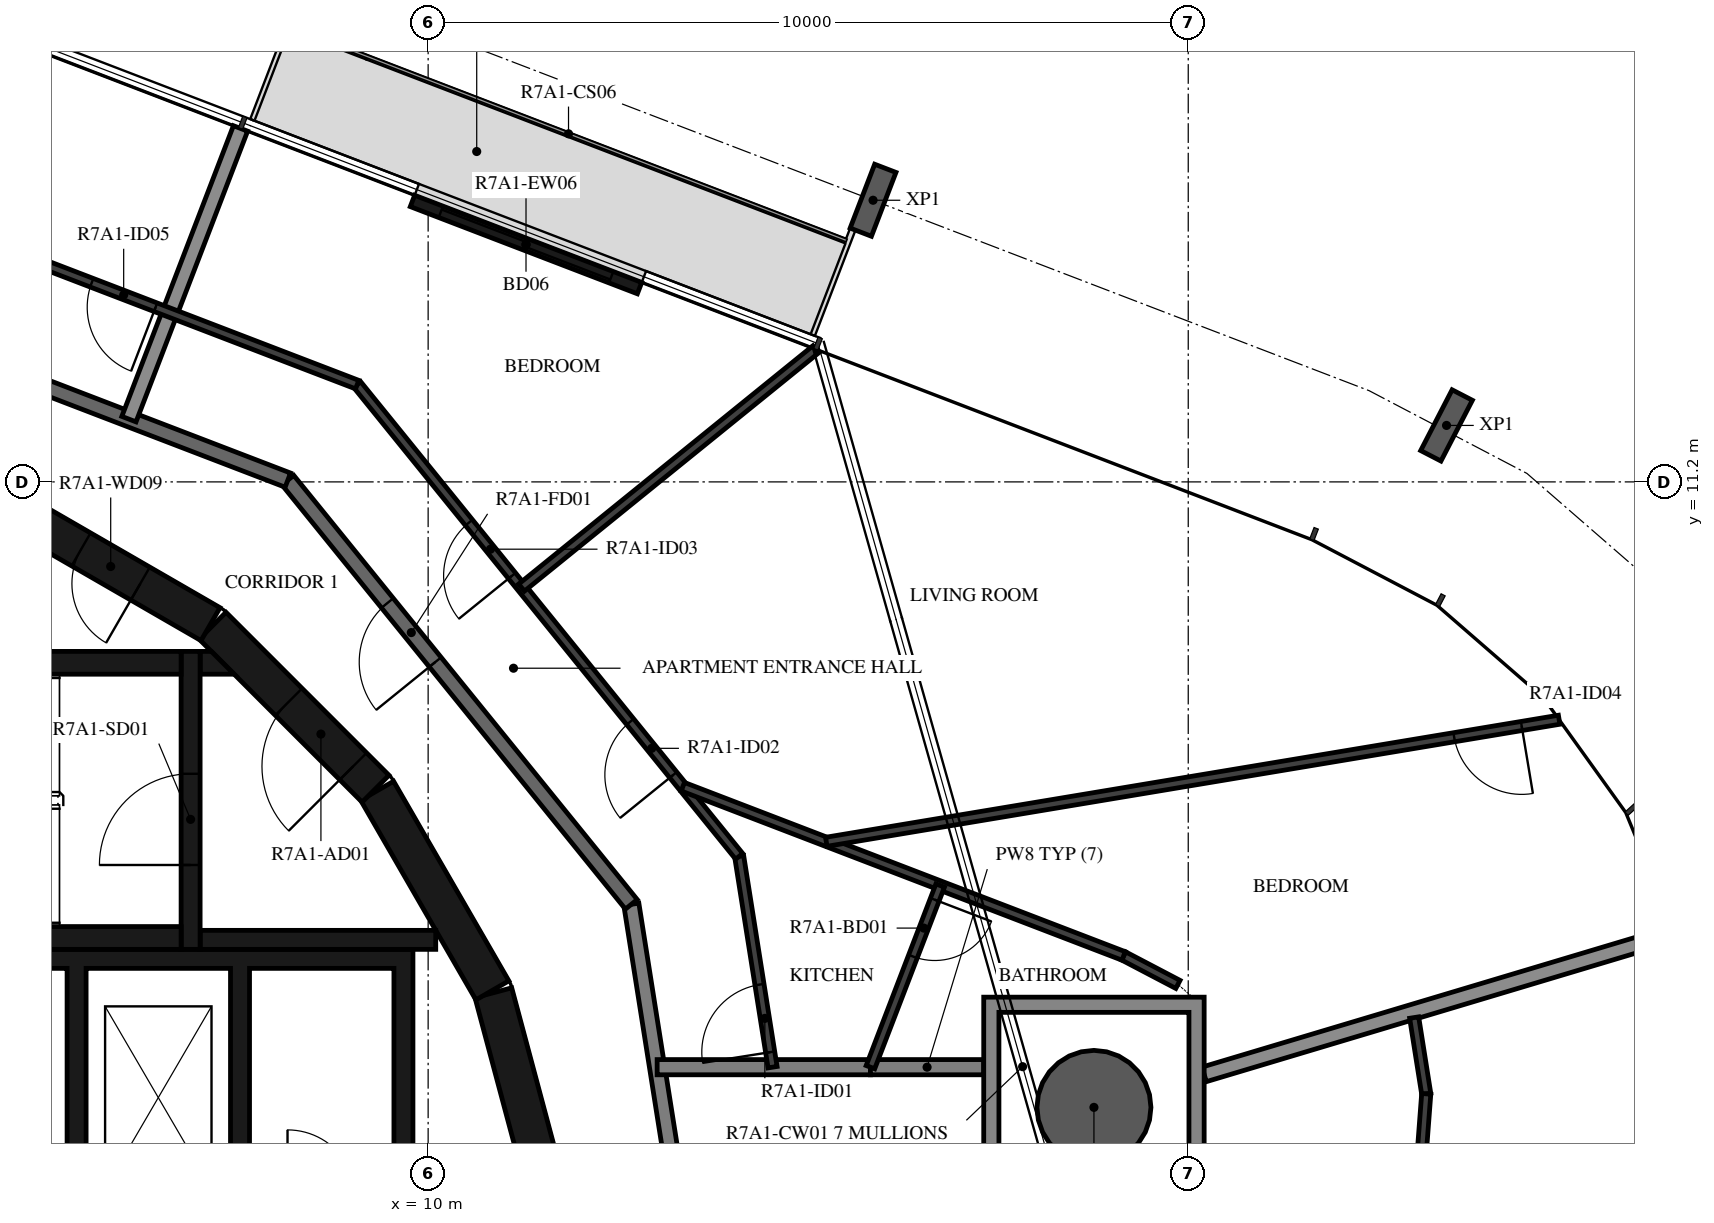
"""IFC4 building model, lengths in metres.
Left out: names, types, materials, properties, quantities, classifications, styles, units other than length and angle.
Written with IfcOpenShell. Run it as: python <this file> out.ifc"""

import sys

from ifc_helpers import new_model, si_unit, direction, frame, frame_2d, origin, origin_2d, place, context, subcontext, project, spatial, polyline, rectangle, hollow_circle, i_section, outline, extrude, element, fill, save


model = new_model("IFC4")
c1 = context("Model", 3, precision=1e-05, world=origin(), true_north=direction((0.0, 1.0)))
c2 = subcontext(c1, "Body", "Model", "MODEL_VIEW")
j1 = project(units=[si_unit("LENGTHUNIT", "METRE"), si_unit("PLANEANGLEUNIT", "RADIAN")], contexts=[c1])
p1 = place(None, origin())
s1 = spatial("IfcSite", under=j1, at=p1, CompositionType="ELEMENT")
p2 = place(p1, origin())
s2 = spatial("IfcBuilding", under=s1, at=p2, CompositionType="ELEMENT")
p3 = place(p2, frame((0.0, 0.0, 266.9)))
s3 = spatial("IfcBuildingStorey", under=s2, at=p3, CompositionType="ELEMENT", Elevation=266.9)
p4 = place(p3, frame((18.76, 2.971, -0.38), z_axis=(0.0, 0.0, 1.0), x_axis=(1.0, 0.0, 0.0)))
e1 = element("IfcColumn", 1, at=p4, inside=s3, PredefinedType="COLUMN", context=c2, shape_type="SweptSolid", body=[
    extrude(hollow_circle(Radius=0.75, WallThickness=0.035, at=origin_2d()), origin(), (0.0, 0.0, 1.0), 3.5),
])
for number, where, z_axis, x_axis in (
    (2, (23.398, 11.943, -0.38), (0.0, 0.0, 1.0), (0.888, -0.459, 0.0)),
    (3, (15.854, 14.905, -0.38), (0.0, 0.0, 1.0), (0.934, -0.358, 0.0)),
):
    element("IfcColumn", number, at=place(p3, frame(where, z_axis=z_axis, x_axis=x_axis)), inside=s3, PredefinedType="COLUMN", context=c2, shape_type="SweptSolid", body=[
        extrude(i_section(OverallWidth=0.3, OverallDepth=0.9, WebThickness=0.019, FlangeThickness=0.035, FilletRadius=0.03, at=origin_2d()), origin(), (0.0, 0.0, 1.0), 3.5),
    ])
p5 = place(p3, frame((12.781, 13.75, 0.0), z_axis=(0.0, 0.0, 1.0), x_axis=(-0.933579413923, 0.358370587381, 0.0)))
e4 = element("IfcWall", 4, at=p5, inside=s3, PredefinedType="STANDARD", context=c2, shape_type="SweptSolid", body=[
    extrude(rectangle(XDim=3.2, YDim=0.16, at=frame_2d((1.6, 0.0))), origin(), (0.0, 0.0, 1.0), 3.12),
])
p6 = place(p5, frame((0.4, 0.0, 0.0)))
e5 = element("IfcOpeningElement", 5, at=p6, cuts=e4, PredefinedType="OPENING", context=c2, shape_type="SweptSolid", body=[
    extrude(rectangle(XDim=2.4, YDim=2.4, at=frame_2d((1.2, 1.2))), frame((0.0, 0.09, 0.0), z_axis=(0.0, -1.0, 0.0), x_axis=(1.0, 0.0, 0.0)), (0.0, 0.0, 1.0), 0.18),
])
for number, where, z_axis, x_axis in (
    (6, (11.643, 1.55, 0.0), (0.0, 0.0, 1.0), (-0.259, 0.966, 0.0)),
    (7, (10.845, 4.51, 0.0), (0.0, 0.0, 1.0), (-0.5, 0.866, 0.0)),
):
    element("IfcWall", number, at=place(p3, frame(where, z_axis=z_axis, x_axis=x_axis)), inside=s3, PredefinedType="SHEAR", context=c2, shape_type="SweptSolid", body=[
        extrude(rectangle(XDim=3.033, YDim=0.5, at=frame_2d((1.516, 0.0))), origin(), (0.0, 0.0, 1.0), 3.12),
    ])
p7 = place(p3, frame((9.308, 7.164, 0.0), z_axis=(0.0, 0.0, 1.0), x_axis=(-0.707106781187, 0.707106781187, 0.0)))
e8 = element("IfcWall", 8, at=p7, inside=s3, PredefinedType="SHEAR", context=c2, shape_type="SweptSolid", body=[
    extrude(rectangle(XDim=3.032, YDim=0.5, at=frame_2d((1.516, 0.0))), origin(), (0.0, 0.0, 1.0), 3.12),
])
p8 = place(p7, frame((0.416, 0.0, 0.0)))
e9 = element("IfcOpeningElement", 9, at=p8, cuts=e8, PredefinedType="OPENING", context=c2, shape_type="SweptSolid", body=[
    extrude(rectangle(XDim=1.2, YDim=2.1, at=frame_2d((0.6, 1.05))), frame((0.0, 0.26, 0.0), z_axis=(0.0, -1.0, 0.0), x_axis=(1.0, 0.0, 0.0)), (0.0, 0.0, 1.0), 0.52),
])
p9 = place(p3, frame((7.137, 9.329, 0.0), z_axis=(0.0, 0.0, 1.0), x_axis=(-0.865975092491, 0.500087131594, 0.0)))
e10 = element("IfcWall", 10, at=p9, inside=s3, PredefinedType="SHEAR", context=c2, shape_type="SweptSolid", body=[
    extrude(rectangle(XDim=3.033, YDim=0.5, at=frame_2d((1.516, 0.0))), origin(), (0.0, 0.0, 1.0), 3.12),
])
p10 = place(p9, frame((1.066, 0.0, 0.0)))
e11 = element("IfcOpeningElement", 11, at=p10, cuts=e10, PredefinedType="OPENING", context=c2, shape_type="SweptSolid", body=[
    extrude(rectangle(XDim=0.9, YDim=2.1, at=frame_2d((0.45, 1.05))), frame((0.0, 0.26, 0.0), z_axis=(0.0, -1.0, 0.0), x_axis=(1.0, 0.0, 0.0)), (0.0, 0.0, 1.0), 0.52),
])
for number, where, z_axis, x_axis in (
    (12, (0.0, 5.2, 0.0), (0.0, 0.0, 1.0), (1.0, 0.0, 0.0)),
    (13, (0.0, 8.82, 0.0), (0.0, 0.0, 1.0), (1.0, 0.0, 0.0)),
):
    element("IfcWall", number, at=place(p3, frame(where, z_axis=z_axis, x_axis=x_axis)), inside=s3, PredefinedType="SHEAR", context=c2, shape_type="SweptSolid", body=[
        extrude(rectangle(XDim=6.75, YDim=0.3, at=frame_2d((3.375, 0.0))), origin(), (0.0, 0.0, 1.0), 3.12),
    ])
p11 = place(p3, frame((6.875, 5.05, 0.0), z_axis=(0.0, 0.0, 1.0), x_axis=(0.0, 1.0, 0.0)))
e14 = element("IfcWall", 14, at=p11, inside=s3, PredefinedType="SHEAR", context=c2, shape_type="SweptSolid", body=[
    extrude(rectangle(XDim=3.92, YDim=0.25, at=frame_2d((1.96, 0.0))), origin(), (0.0, 0.0, 1.0), 3.12),
])
p12 = place(p11, frame((1.11, 0.0, 0.0)))
e15 = element("IfcOpeningElement", 15, at=p12, cuts=e14, PredefinedType="OPENING", context=c2, shape_type="SweptSolid", body=[
    extrude(rectangle(XDim=1.2, YDim=2.1, at=frame_2d((0.6, 1.05))), frame((0.0, 0.135, 0.0), z_axis=(0.0, -1.0, 0.0), x_axis=(1.0, 0.0, 0.0)), (0.0, 0.0, 1.0), 0.27),
])
p13 = place(p3, frame((7.0, 5.175, 0.0), z_axis=(0.0, 0.0, 1.0), x_axis=(1.0, 0.0, 0.0)))
e16 = element("IfcWall", 16, at=p13, inside=s3, PredefinedType="SHEAR", context=c2, shape_type="SweptSolid", body=[
    extrude(rectangle(XDim=3.1, YDim=0.25, at=frame_2d((1.55, 0.0))), origin(), (0.0, 0.0, 1.0), 3.12),
])
p14 = place(p3, origin())
e17 = element("IfcWall", 17, at=p14, inside=s3, PredefinedType="SHEAR", context=c2, shape_type="SweptSolid", body=[
    extrude(outline(polyline([(7.448, 8.67), (7.0, 8.67), (7.0, 8.97), (7.148, 8.97), (7.448, 8.67)])), origin(), (0.0, 0.0, 1.0), 3.12),
])
p15 = place(p3, origin())
e18 = element("IfcWall", 18, at=p15, inside=s3, PredefinedType="SHEAR", context=c2, shape_type="SweptSolid", body=[
    extrude(outline(polyline([(-9.8, 1.9), (-9.55, 1.9), (-9.55, 4.8), (3.1, 4.8), (3.1, 1.9), (3.35, 1.9), (3.35, 4.8), (5.25, 4.8), (5.25, 1.9), (5.5, 1.9), (5.5, 4.8), (7.4, 4.8), (7.4, 1.9), (7.65, 1.9), (7.65, 4.8), (9.55, 4.8), (9.55, 1.9), (9.8, 1.9), (9.8, 4.8), (9.8, 5.05), (-9.8, 5.05), (-9.8, 4.8), (-9.8, 1.9)])), origin(), (0.0, 0.0, 1.0), 3.12),
])
p16 = place(p3, frame((13.797, -1.45, 0.0), z_axis=(0.0, 0.0, 1.0), x_axis=(-0.156421704315, 0.987690361611, 0.0)))
e19 = element("IfcWall", 19, at=p16, inside=s3, PredefinedType="STANDARD", context=c2, shape_type="SweptSolid", body=[
    extrude(rectangle(XDim=7.181, YDim=0.2, at=frame_2d((3.591, 0.0))), origin(), (0.0, 0.0, 1.0), 3.12),
])
p17 = place(p3, frame((12.673, 5.643, 0.0), z_axis=(0.0, 0.0, 1.0), x_axis=(-0.629302871585, 0.777160148113, 0.0)))
e20 = element("IfcWall", 20, at=p17, inside=s3, PredefinedType="STANDARD", context=c2, shape_type="SweptSolid", body=[
    extrude(rectangle(XDim=7.181, YDim=0.2, at=frame_2d((3.59, 0.0))), origin(), (0.0, 0.0, 1.0), 3.12),
])
p18 = place(p17, frame((4.1, 0.0, 0.0)))
e21 = element("IfcOpeningElement", 21, at=p18, cuts=e20, PredefinedType="OPENING", context=c2, shape_type="SweptSolid", body=[
    extrude(rectangle(XDim=1.0, YDim=2.1, at=frame_2d((0.5, 1.05))), frame((0.0, 0.11, 0.0), z_axis=(0.0, -1.0, 0.0), x_axis=(1.0, 0.0, 0.0)), (0.0, 0.0, 1.0), 0.22),
])
p19 = place(p3, frame((8.154, 11.223, 0.0), z_axis=(0.0, 0.0, 1.0), x_axis=(-0.93359073609, 0.358341090983, 0.0)))
e22 = element("IfcWall", 22, at=p19, inside=s3, PredefinedType="STANDARD", context=c2, shape_type="SweptSolid", body=[
    extrude(rectangle(XDim=7.181, YDim=0.2, at=frame_2d((3.59, 0.0))), origin(), (0.0, 0.0, 1.0), 3.12),
])
p20 = place(p3, frame((15.819, 3.5, 0.0), z_axis=(0.0, 0.0, 1.0), x_axis=(-1.0, 0.0, 0.0)))
e23 = element("IfcWall", 23, at=p20, inside=s3, PredefinedType="STANDARD", context=c2, shape_type="SweptSolid", body=[
    extrude(rectangle(XDim=2.806, YDim=0.2, at=frame_2d((1.403, 0.0))), origin(), (0.0, 0.0, 1.0), 3.12),
])
p21 = place(p3, frame((17.309, 3.5, 0.0), z_axis=(0.0, 0.0, 1.0), x_axis=(-1.0, 0.0, 0.0)))
e24 = element("IfcWall", 24, at=p21, inside=s3, PredefinedType="STANDARD", context=c2, shape_type="SweptSolid", body=[
    extrude(rectangle(XDim=1.49, YDim=0.2, at=frame_2d((0.745, 0.0))), origin(), (0.0, 0.0, 1.0), 3.12),
])
p22 = place(p3, frame((7.532, 15.85, 0.0), z_axis=(0.0, 0.0, 1.0), x_axis=(-0.358355996975, -0.933585014571, 0.0)))
e25 = element("IfcWall", 25, at=p22, inside=s3, PredefinedType="STANDARD", context=c2, shape_type="SweptSolid", body=[
    extrude(rectangle(XDim=4.096, YDim=0.2, at=frame_2d((2.048, 0.0))), origin(), (0.0, 0.0, 1.0), 2.73),
])
p23 = place(p3, frame((20.209, 3.405, 0.0), z_axis=(0.0, 0.0, 1.0), x_axis=(0.957991224208, 0.286797514529, 0.0)))
e26 = element("IfcWall", 26, at=p23, inside=s3, PredefinedType="STANDARD", context=c2, shape_type="SweptSolid", body=[
    extrude(rectangle(XDim=6.471, YDim=0.2, at=frame_2d((3.236, 0.0))), origin(), (0.0, 0.0, 1.0), 2.73),
])
p24 = place(p3, frame((14.531, 3.5, 0.0), z_axis=(0.0, 0.0, 1.0), x_axis=(-0.1564580042, 0.987684612071, 0.0)))
e27 = element("IfcWall", 27, at=p24, inside=s3, PredefinedType="PARTITIONING", context=c2, shape_type="SweptSolid", body=[
    extrude(rectangle(XDim=2.809, YDim=0.12, at=frame_2d((1.404, 0.0))), origin(), (0.0, 0.0, 1.0), 3.12),
])
p25 = place(p24, frame((0.2, 0.0, 0.0)))
e28 = element("IfcOpeningElement", 28, at=p25, cuts=e27, PredefinedType="OPENING", context=c2, shape_type="SweptSolid", body=[
    extrude(rectangle(XDim=0.9, YDim=2.1, at=frame_2d((0.45, 1.05))), frame((0.0, 0.07, 0.0), z_axis=(0.0, -1.0, 0.0), x_axis=(1.0, 0.0, 0.0)), (0.0, 0.0, 1.0), 0.14),
])
p26 = place(p3, frame((14.092, 6.274, 0.0), z_axis=(0.0, 0.0, 1.0), x_axis=(-0.62933367237, 0.777135206268, 0.0)))
e29 = element("IfcWall", 29, at=p26, inside=s3, PredefinedType="PARTITIONING", context=c2, shape_type="SweptSolid", body=[
    extrude(rectangle(XDim=7.985, YDim=0.12, at=frame_2d((3.992, 0.0))), origin(), (0.0, 0.0, 1.0), 3.12),
])
p27 = place(p26, frame((1.378, 0.0, 0.0)))
e30 = element("IfcOpeningElement", 30, at=p27, cuts=e29, PredefinedType="OPENING", context=c2, shape_type="SweptSolid", body=[
    extrude(rectangle(XDim=0.9, YDim=2.1, at=frame_2d((0.45, 1.05))), frame((0.0, 0.07, 0.0), z_axis=(0.0, -1.0, 0.0), x_axis=(1.0, 0.0, 0.0)), (0.0, 0.0, 1.0), 0.14),
])
p28 = place(p26, frame((4.749, 0.0, 0.0)))
e31 = element("IfcOpeningElement", 31, at=p28, cuts=e29, PredefinedType="OPENING", context=c2, shape_type="SweptSolid", body=[
    extrude(rectangle(XDim=0.9, YDim=2.1, at=frame_2d((0.45, 1.05))), frame((0.0, 0.07, 0.0), z_axis=(0.0, -1.0, 0.0), x_axis=(1.0, 0.0, 0.0)), (0.0, 0.0, 1.0), 0.14),
])
p29 = place(p3, frame((9.067, 12.479, 0.0), z_axis=(0.0, 0.0, 1.0), x_axis=(-0.933579449035, 0.358370495911, 0.0)))
e32 = element("IfcWall", 32, at=p29, inside=s3, PredefinedType="PARTITIONING", context=c2, shape_type="SweptSolid", body=[
    extrude(rectangle(XDim=7.985, YDim=0.12, at=frame_2d((3.992, 0.0))), origin(), (0.0, 0.0, 1.0), 3.12),
])
p30 = place(p29, frame((2.841, 0.0, 0.0)))
e33 = element("IfcOpeningElement", 33, at=p30, cuts=e32, PredefinedType="OPENING", context=c2, shape_type="SweptSolid", body=[
    extrude(rectangle(XDim=0.9, YDim=2.1, at=frame_2d((0.45, 1.05))), frame((0.0, 0.07, 0.0), z_axis=(0.0, -1.0, 0.0), x_axis=(1.0, 0.0, 0.0)), (0.0, 0.0, 1.0), 0.14),
])
p31 = place(p3, frame((19.865, 4.589, 0.0), z_axis=(0.0, 0.0, 1.0), x_axis=(-0.885855229108, 0.46396175819, 0.0)))
e34 = element("IfcWall", 34, at=p31, inside=s3, PredefinedType="PARTITIONING", context=c2, shape_type="SweptSolid", body=[
    extrude(rectangle(XDim=0.807, YDim=0.12, at=frame_2d((0.403, 0.0))), origin(), (0.0, 0.0, 1.0), 3.12),
])
p32 = place(p3, frame((19.15, 4.963, 0.0), z_axis=(0.0, 0.0, 1.0), x_axis=(-0.933571304602, 0.358391711992, 0.0)))
e35 = element("IfcWall", 35, at=p32, inside=s3, PredefinedType="PARTITIONING", context=c2, shape_type="SweptSolid", body=[
    extrude(rectangle(XDim=6.212, YDim=0.12, at=frame_2d((3.106, 0.0))), origin(), (0.0, 0.0, 1.0), 3.12),
])
p33 = place(p3, frame((16.737, 5.89, 0.0), z_axis=(0.0, 0.0, 1.0), x_axis=(-0.358397454141, -0.933569100209, 0.0)))
e36 = element("IfcWall", 36, at=p33, inside=s3, PredefinedType="PARTITIONING", context=c2, shape_type="SweptSolid", body=[
    extrude(rectangle(XDim=2.56, YDim=0.12, at=frame_2d((1.28, 0.0))), origin(), (0.0, 0.0, 1.0), 3.12),
])
p34 = place(p33, frame((0.2, 0.0, 0.0)))
e37 = element("IfcOpeningElement", 37, at=p34, cuts=e36, PredefinedType="OPENING", context=c2, shape_type="SweptSolid", body=[
    extrude(rectangle(XDim=0.8, YDim=2.1, at=frame_2d((0.4, 1.05))), frame((0.0, 0.07, 0.0), z_axis=(0.0, -1.0, 0.0), x_axis=(1.0, 0.0, 0.0)), (0.0, 0.0, 1.0), 0.14),
])
p35 = place(p3, frame((24.88, 8.071, 0.0), z_axis=(0.0, 0.0, 1.0), x_axis=(-0.986414168431, -0.164277473558, 0.0)))
e38 = element("IfcWall", 38, at=p35, inside=s3, PredefinedType="PARTITIONING", context=c2, shape_type="SweptSolid", body=[
    extrude(rectangle(XDim=9.774, YDim=0.12, at=frame_2d((4.887, 0.0))), origin(), (0.0, 0.0, 1.0), 3.12),
])
p36 = place(p35, frame((0.5, 0.0, 0.0)))
e39 = element("IfcOpeningElement", 39, at=p36, cuts=e38, PredefinedType="OPENING", context=c2, shape_type="SweptSolid", body=[
    extrude(rectangle(XDim=0.9, YDim=2.1, at=frame_2d((0.45, 1.05))), frame((0.0, 0.07, 0.0), z_axis=(0.0, -1.0, 0.0), x_axis=(1.0, 0.0, 0.0)), (0.0, 0.0, 1.0), 0.14),
])
p37 = place(p3, frame((15.101, 12.945, 0.0), z_axis=(0.0, 0.0, 1.0), x_axis=(-0.777178675378, -0.629279990575, 0.0)))
e40 = element("IfcWall", 40, at=p37, inside=s3, PredefinedType="PARTITIONING", context=c2, shape_type="SweptSolid", body=[
    extrude(rectangle(XDim=4.982, YDim=0.12, at=frame_2d((2.491, 0.0))), origin(), (0.0, 0.0, 1.0), 3.12),
])
p38 = place(p3, frame((22.972, 4.153, 0.0), z_axis=(0.0, 0.0, 1.0), x_axis=(0.156209385929, -0.987723963336, 0.0)))
e41 = element("IfcWall", 41, at=p38, inside=s3, PredefinedType="PARTITIONING", context=c2, shape_type="SweptSolid", body=[
    extrude(rectangle(XDim=1.016, YDim=0.12, at=frame_2d((0.508, 0.0))), origin(), (0.0, 0.0, 1.0), 3.12),
])
p39 = place(p3, frame((23.131, 3.149, 0.0), z_axis=(0.0, 0.0, 1.0), x_axis=(-0.075446997935, -0.99714981347, 0.0)))
e42 = element("IfcWall", 42, at=p39, inside=s3, PredefinedType="PARTITIONING", context=c2, shape_type="SweptSolid", body=[
    extrude(rectangle(XDim=1.016, YDim=0.12, at=frame_2d((0.508, 0.0))), origin(), (0.0, 0.0, 1.0), 3.12),
])
p40 = place(p3, origin())
e43 = element("IfcWall", 43, at=p40, inside=s3, PredefinedType="STANDARD", context=c2, shape_type="SweptSolid", body=[
    extrude(outline(polyline([(20.209, 4.421), (20.209, 1.521), (17.309, 1.521), (17.309, 4.421), (20.209, 4.421)]), holes=[polyline([(17.51, 1.721), (20.01, 1.721), (20.01, 4.221), (17.51, 4.221), (17.51, 1.721)])]), origin(), (0.0, 0.0, 1.0), 3.12),
])
p41 = place(p6, origin())
e44 = element("IfcDoor", 44, at=p41, inside=s3, OperationType="DOUBLE_DOOR_SLIDING", PredefinedType="DOOR", context=c2, shape_type="SweptSolid", body=[
    extrude(rectangle(XDim=2.4, YDim=2.4, at=frame_2d((1.2, 1.2))), frame((0.0, 0.025, 0.0), z_axis=(0.0, -1.0, 0.0), x_axis=(1.0, 0.0, 0.0)), (0.0, 0.0, 1.0), 0.05),
])
fill(e5, e44)
p42 = place(p12, origin())
e45 = element("IfcDoor", 45, at=p42, inside=s3, OperationType="SINGLE_SWING_LEFT", PredefinedType="DOOR", context=c2, shape_type="SweptSolid", body=[
    extrude(rectangle(XDim=1.2, YDim=2.1, at=frame_2d((0.6, 1.05))), frame((0.0, 0.025, 0.0), z_axis=(0.0, -1.0, 0.0), x_axis=(1.0, 0.0, 0.0)), (0.0, 0.0, 1.0), 0.05),
])
fill(e15, e45)
p43 = place(p8, origin())
e46 = element("IfcDoor", 46, at=p43, inside=s3, OperationType="SINGLE_SWING_RIGHT", PredefinedType="DOOR", context=c2, shape_type="SweptSolid", body=[
    extrude(rectangle(XDim=1.2, YDim=2.1, at=frame_2d((0.6, 1.05))), frame((0.0, 0.025, 0.0), z_axis=(0.0, -1.0, 0.0), x_axis=(1.0, 0.0, 0.0)), (0.0, 0.0, 1.0), 0.05),
])
fill(e9, e46)
p44 = place(p10, origin())
e47 = element("IfcDoor", 47, at=p44, inside=s3, OperationType="SINGLE_SWING_LEFT", PredefinedType="DOOR", context=c2, shape_type="SweptSolid", body=[
    extrude(rectangle(XDim=0.9, YDim=2.1, at=frame_2d((0.45, 1.05))), frame((0.0, 0.025, 0.0), z_axis=(0.0, -1.0, 0.0), x_axis=(1.0, 0.0, 0.0)), (0.0, 0.0, 1.0), 0.05),
])
fill(e11, e47)
p45 = place(p18, origin())
e48 = element("IfcDoor", 48, at=p45, inside=s3, OperationType="SINGLE_SWING_LEFT", PredefinedType="DOOR", context=c2, shape_type="SweptSolid", body=[
    extrude(rectangle(XDim=1.0, YDim=2.1, at=frame_2d((0.5, 1.05))), frame((0.0, 0.025, 0.0), z_axis=(0.0, -1.0, 0.0), x_axis=(1.0, 0.0, 0.0)), (0.0, 0.0, 1.0), 0.05),
])
fill(e21, e48)
p46 = place(p25, origin())
e49 = element("IfcDoor", 49, at=p46, inside=s3, OperationType="SINGLE_SWING_LEFT", PredefinedType="DOOR", context=c2, shape_type="SweptSolid", body=[
    extrude(rectangle(XDim=0.9, YDim=2.1, at=frame_2d((0.45, 1.05))), frame((0.0, 0.025, 0.0), z_axis=(0.0, -1.0, 0.0), x_axis=(1.0, 0.0, 0.0)), (0.0, 0.0, 1.0), 0.05),
])
fill(e28, e49)
p47 = place(p27, origin())
e50 = element("IfcDoor", 50, at=p47, inside=s3, OperationType="SINGLE_SWING_LEFT", PredefinedType="DOOR", context=c2, shape_type="SweptSolid", body=[
    extrude(rectangle(XDim=0.9, YDim=2.1, at=frame_2d((0.45, 1.05))), frame((0.0, 0.025, 0.0), z_axis=(0.0, -1.0, 0.0), x_axis=(1.0, 0.0, 0.0)), (0.0, 0.0, 1.0), 0.05),
])
fill(e30, e50)
p48 = place(p28, origin())
e51 = element("IfcDoor", 51, at=p48, inside=s3, OperationType="SINGLE_SWING_LEFT", PredefinedType="DOOR", context=c2, shape_type="SweptSolid", body=[
    extrude(rectangle(XDim=0.9, YDim=2.1, at=frame_2d((0.45, 1.05))), frame((0.0, 0.025, 0.0), z_axis=(0.0, -1.0, 0.0), x_axis=(1.0, 0.0, 0.0)), (0.0, 0.0, 1.0), 0.05),
])
fill(e31, e51)
p49 = place(p34, origin())
e52 = element("IfcDoor", 52, at=p49, inside=s3, OperationType="SINGLE_SWING_LEFT", PredefinedType="DOOR", context=c2, shape_type="SweptSolid", body=[
    extrude(rectangle(XDim=0.8, YDim=2.1, at=frame_2d((0.4, 1.05))), frame((0.0, 0.025, 0.0), z_axis=(0.0, -1.0, 0.0), x_axis=(1.0, 0.0, 0.0)), (0.0, 0.0, 1.0), 0.05),
])
fill(e37, e52)
p50 = place(p36, origin())
e53 = element("IfcDoor", 53, at=p50, inside=s3, OperationType="SINGLE_SWING_LEFT", PredefinedType="DOOR", context=c2, shape_type="SweptSolid", body=[
    extrude(rectangle(XDim=0.9, YDim=2.1, at=frame_2d((0.45, 1.05))), frame((0.0, 0.025, 0.0), z_axis=(0.0, -1.0, 0.0), x_axis=(1.0, 0.0, 0.0)), (0.0, 0.0, 1.0), 0.05),
])
fill(e39, e53)
p51 = place(p30, origin())
e54 = element("IfcDoor", 54, at=p51, inside=s3, OperationType="SINGLE_SWING_LEFT", PredefinedType="DOOR", context=c2, shape_type="SweptSolid", body=[
    extrude(rectangle(XDim=0.9, YDim=2.1, at=frame_2d((0.45, 1.05))), frame((0.0, 0.025, 0.0), z_axis=(0.0, -1.0, 0.0), x_axis=(1.0, 0.0, 0.0)), (0.0, 0.0, 1.0), 0.05),
])
fill(e33, e54)
save(model, sys.argv[1])
